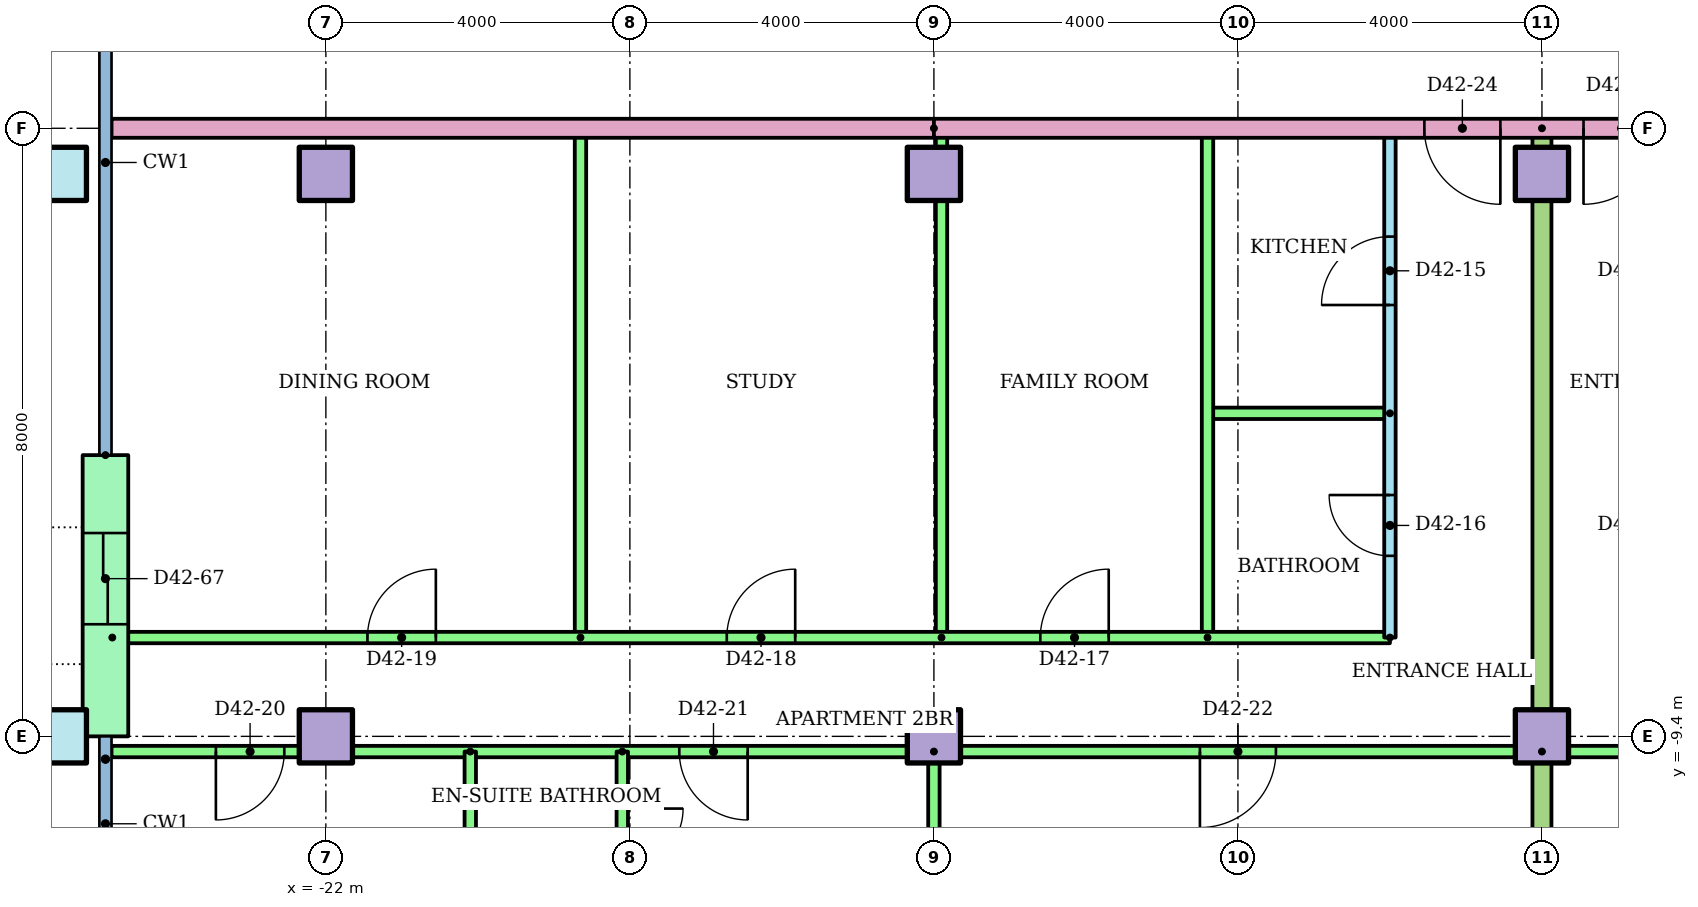
"""IFC4 building model, lengths in metres.
Left out: names, types, materials, properties, quantities, classifications, styles, units other than length and angle.
Written with IfcOpenShell. Run it as: python <this file> out.ifc"""

import sys

from ifc_helpers import new_model, si_unit, direction, frame, frame_2d, origin, origin_2d, place, context, subcontext, project, spatial, rectangle, hollow_rectangle, extrude, element, fill, save


model = new_model("IFC4")
c1 = context("Model", 3, precision=1e-05, world=origin(), true_north=direction((0.0, 1.0)))
c2 = subcontext(c1, "Body", "Model", "MODEL_VIEW")
j1 = project(units=[si_unit("LENGTHUNIT", "METRE"), si_unit("PLANEANGLEUNIT", "RADIAN")], contexts=[c1])
p1 = place(None, origin())
s1 = spatial("IfcSite", under=j1, at=p1, CompositionType="ELEMENT")
p2 = place(p1, origin())
s2 = spatial("IfcBuilding", under=s1, at=p2, CompositionType="ELEMENT")
p3 = place(p2, frame((0.0, 0.0, 165.3)))
s3 = spatial("IfcBuildingStorey", under=s2, at=p3, CompositionType="ELEMENT", Elevation=165.3)
p4 = place(p3, frame((-25.5, -9.4, 0.0)))
e1 = element("IfcColumn", 1, at=p4, inside=s3, PredefinedType="COLUMN", context=c2, shape_type="SweptSolid", body=[
    extrude(hollow_rectangle(XDim=0.7, YDim=0.7, WallThickness=0.036, at=origin_2d()), origin(), (0.0, 0.0, 1.0), 3.2),
])
for number, where in (
    (2, (-22.0, -9.4, 0.0)),
    (3, (-14.0, -9.4, 0.0)),
    (4, (-6.0, -9.4, 0.0)),
):
    element("IfcColumn", number, at=place(p3, frame(where)), inside=s3, PredefinedType="COLUMN", context=c2, shape_type="SweptSolid", body=[
        extrude(rectangle(XDim=0.7, YDim=0.7, at=origin_2d()), origin(), (0.0, 0.0, 1.0), 3.2),
    ])
p5 = place(p3, frame((-25.5, -2.0, 0.0)))
e5 = element("IfcColumn", 5, at=p5, inside=s3, PredefinedType="COLUMN", context=c2, shape_type="SweptSolid", body=[
    extrude(hollow_rectangle(XDim=0.7, YDim=0.7, WallThickness=0.036, at=origin_2d()), origin(), (0.0, 0.0, 1.0), 3.2),
])
for number, where in (
    (6, (-22.0, -2.0, 0.0)),
    (7, (-14.0, -2.0, 0.0)),
    (8, (-6.0, -2.0, 0.0)),
):
    element("IfcColumn", number, at=place(p3, frame(where)), inside=s3, PredefinedType="COLUMN", context=c2, shape_type="SweptSolid", body=[
        extrude(rectangle(XDim=0.7, YDim=0.7, at=origin_2d()), origin(), (0.0, 0.0, 1.0), 3.2),
    ])
p6 = place(p3, frame((-24.9, -5.7, 0.0), z_axis=(0.0, 0.0, 1.0), x_axis=(0.0, -1.0, 0.0)))
e9 = element("IfcWall", 9, at=p6, inside=s3, PredefinedType="STANDARD", context=c2, shape_type="SweptSolid", body=[
    extrude(rectangle(XDim=3.7, YDim=0.6, at=frame_2d((1.85, 0.0))), origin(), (0.0, 0.0, 1.0), 2.92),
])
p7 = place(p6, frame((1.025, 0.0, 0.0)))
e10 = element("IfcOpeningElement", 10, at=p7, cuts=e9, PredefinedType="OPENING", context=c2, shape_type="SweptSolid", body=[
    extrude(rectangle(XDim=1.2, YDim=2.1, at=frame_2d((0.6, 1.05))), frame((0.0, 0.31, 0.0), z_axis=(0.0, -1.0, 0.0), x_axis=(1.0, 0.0, 0.0)), (0.0, 0.0, 1.0), 0.62),
])
p8 = place(p3, frame((-8.0, -8.1, 0.0), z_axis=(0.0, 0.0, 1.0), x_axis=(0.0, 1.0, 0.0)))
e11 = element("IfcWall", 11, at=p8, inside=s3, PredefinedType="PARTITIONING", context=c2, shape_type="SweptSolid", body=[
    extrude(rectangle(XDim=6.7, YDim=0.15, at=frame_2d((3.35, 0.0))), origin(), (0.0, 0.0, 1.0), 2.4),
])
p9 = place(p8, frame((4.375, 0.0, 0.0)))
e12 = element("IfcOpeningElement", 12, at=p9, cuts=e11, PredefinedType="OPENING", context=c2, shape_type="SweptSolid", body=[
    extrude(rectangle(XDim=0.9, YDim=2.1, at=frame_2d((0.45, 1.05))), frame((0.0, 0.085, 0.0), z_axis=(0.0, -1.0, 0.0), x_axis=(1.0, 0.0, 0.0)), (0.0, 0.0, 1.0), 0.17),
])
p10 = place(p8, frame((1.075, 0.0, 0.0)))
e13 = element("IfcOpeningElement", 13, at=p10, cuts=e11, PredefinedType="OPENING", context=c2, shape_type="SweptSolid", body=[
    extrude(rectangle(XDim=0.8, YDim=2.1, at=frame_2d((0.4, 1.05))), frame((0.0, 0.085, 0.0), z_axis=(0.0, -1.0, 0.0), x_axis=(1.0, 0.0, 0.0)), (0.0, 0.0, 1.0), 0.17),
])
p11 = place(p3, frame((-8.0, -5.15, 0.0), z_axis=(0.0, 0.0, 1.0), x_axis=(-1.0, 0.0, 0.0)))
e14 = element("IfcWall", 14, at=p11, inside=s3, PredefinedType="PARTITIONING", context=c2, shape_type="SweptSolid", body=[
    extrude(rectangle(XDim=2.4, YDim=0.15, at=frame_2d((1.2, 0.0))), origin(), (0.0, 0.0, 1.0), 2.4),
])
for number, where, z_axis, x_axis in (
    (15, (-10.4, -8.1, 0.0), (0.0, 0.0, 1.0), (0.0, 1.0, 0.0)),
    (16, (-13.9, -8.1, 0.0), (0.0, 0.0, 1.0), (0.0, 1.0, 0.0)),
    (17, (-18.65, -8.1, 0.0), (0.0, 0.0, 1.0), (0.0, 1.0, 0.0)),
):
    element("IfcWall", number, at=place(p3, frame(where, z_axis=z_axis, x_axis=x_axis)), inside=s3, PredefinedType="PARTITIONING", context=c2, shape_type="SweptSolid", body=[
        extrude(rectangle(XDim=6.7, YDim=0.15, at=frame_2d((3.35, 0.0))), origin(), (0.0, 0.0, 1.0), 2.4),
    ])
p12 = place(p3, frame((-24.81, -8.1, 0.0)))
e18 = element("IfcWall", 18, at=p12, inside=s3, PredefinedType="PARTITIONING", context=c2, shape_type="SweptSolid", body=[
    extrude(rectangle(XDim=16.81, YDim=0.15, at=frame_2d((8.405, 0.0))), origin(), (0.0, 0.0, 1.0), 2.4),
])
p13 = place(p12, frame((12.21, 0.0, 0.0)))
e19 = element("IfcOpeningElement", 19, at=p13, cuts=e18, PredefinedType="OPENING", context=c2, shape_type="SweptSolid", body=[
    extrude(rectangle(XDim=0.9, YDim=2.1, at=frame_2d((0.45, 1.05))), frame((0.0, 0.085, 0.0), z_axis=(0.0, -1.0, 0.0), x_axis=(1.0, 0.0, 0.0)), (0.0, 0.0, 1.0), 0.17),
])
p14 = place(p12, frame((8.085, 0.0, 0.0)))
e20 = element("IfcOpeningElement", 20, at=p14, cuts=e18, PredefinedType="OPENING", context=c2, shape_type="SweptSolid", body=[
    extrude(rectangle(XDim=0.9, YDim=2.1, at=frame_2d((0.45, 1.05))), frame((0.0, 0.085, 0.0), z_axis=(0.0, -1.0, 0.0), x_axis=(1.0, 0.0, 0.0)), (0.0, 0.0, 1.0), 0.17),
])
p15 = place(p12, frame((3.357, 0.0, 0.0)))
e21 = element("IfcOpeningElement", 21, at=p15, cuts=e18, PredefinedType="OPENING", context=c2, shape_type="SweptSolid", body=[
    extrude(rectangle(XDim=0.9, YDim=2.1, at=frame_2d((0.45, 1.05))), frame((0.0, 0.085, 0.0), z_axis=(0.0, -1.0, 0.0), x_axis=(1.0, 0.0, 0.0)), (0.0, 0.0, 1.0), 0.17),
])
p16 = place(p3, frame((-6.0, -9.6, 0.0), z_axis=(0.0, 0.0, 1.0), x_axis=(-1.0, 0.0, 0.0)))
e22 = element("IfcWall", 22, at=p16, inside=s3, PredefinedType="PARTITIONING", context=c2, shape_type="SweptSolid", body=[
    extrude(rectangle(XDim=18.82, YDim=0.15, at=frame_2d((9.41, 0.0))), origin(), (0.0, 0.0, 1.0), 2.4),
])
p17 = place(p16, frame((16.547, 0.0, 0.0)))
e23 = element("IfcOpeningElement", 23, at=p17, cuts=e22, PredefinedType="OPENING", context=c2, shape_type="SweptSolid", body=[
    extrude(rectangle(XDim=0.9, YDim=2.1, at=frame_2d((0.45, 1.05))), frame((0.0, 0.085, 0.0), z_axis=(0.0, -1.0, 0.0), x_axis=(1.0, 0.0, 0.0)), (0.0, 0.0, 1.0), 0.17),
])
p18 = place(p16, frame((10.45, 0.0, 0.0)))
e24 = element("IfcOpeningElement", 24, at=p18, cuts=e22, PredefinedType="OPENING", context=c2, shape_type="SweptSolid", body=[
    extrude(rectangle(XDim=0.9, YDim=2.1, at=frame_2d((0.45, 1.05))), frame((0.0, 0.085, 0.0), z_axis=(0.0, -1.0, 0.0), x_axis=(1.0, 0.0, 0.0)), (0.0, 0.0, 1.0), 0.17),
])
p19 = place(p16, frame((3.5, 0.0, 0.0)))
e25 = element("IfcOpeningElement", 25, at=p19, cuts=e22, PredefinedType="OPENING", context=c2, shape_type="SweptSolid", body=[
    extrude(rectangle(XDim=1.0, YDim=2.1, at=frame_2d((0.5, 1.05))), frame((0.0, 0.085, 0.0), z_axis=(0.0, -1.0, 0.0), x_axis=(1.0, 0.0, 0.0)), (0.0, 0.0, 1.0), 0.17),
])
p20 = place(p3, frame((-20.1, -9.6, 0.0), z_axis=(0.0, 0.0, 1.0), x_axis=(0.0, -1.0, 0.0)))
e26 = element("IfcWall", 26, at=p20, inside=s3, PredefinedType="PARTITIONING", context=c2, shape_type="SweptSolid", body=[
    extrude(rectangle(XDim=5.02, YDim=0.15, at=frame_2d((2.51, 0.0))), origin(), (0.0, 0.0, 1.0), 2.4),
])
p21 = place(p3, frame((-14.0, -9.6, 0.0), z_axis=(0.0, 0.0, 1.0), x_axis=(0.0, -1.0, 0.0)))
e27 = element("IfcWall", 27, at=p21, inside=s3, PredefinedType="PARTITIONING", context=c2, shape_type="SweptSolid", body=[
    extrude(rectangle(XDim=6.81, YDim=0.15, at=frame_2d((3.405, 0.0))), origin(), (0.0, 0.0, 1.0), 2.4),
])
p22 = place(p3, frame((-18.1, -9.6, 0.0), z_axis=(0.0, 0.0, 1.0), x_axis=(0.0, -1.0, 0.0)))
e28 = element("IfcWall", 28, at=p22, inside=s3, PredefinedType="PARTITIONING", context=c2, shape_type="SweptSolid", body=[
    extrude(rectangle(XDim=2.3, YDim=0.15, at=frame_2d((1.15, 0.0))), origin(), (0.0, 0.0, 1.0), 2.4),
])
p23 = place(p22, frame((0.75, 0.0, 0.0)))
e29 = element("IfcOpeningElement", 29, at=p23, cuts=e28, PredefinedType="OPENING", context=c2, shape_type="SweptSolid", body=[
    extrude(rectangle(XDim=0.8, YDim=2.1, at=frame_2d((0.4, 1.05))), frame((0.0, 0.085, 0.0), z_axis=(0.0, -1.0, 0.0), x_axis=(1.0, 0.0, 0.0)), (0.0, 0.0, 1.0), 0.17),
])
p24 = place(p3, frame((10.0, -9.6, 0.0), z_axis=(0.0, 0.0, 1.0), x_axis=(-1.0, 0.0, 0.0)))
e30 = element("IfcWall", 30, at=p24, inside=s3, PredefinedType="PARTITIONING", context=c2, shape_type="SweptSolid", body=[
    extrude(rectangle(XDim=16.0, YDim=0.15, at=frame_2d((8.0, 0.0))), origin(), (0.0, 0.0, 1.0), 2.4),
])
p25 = place(p24, frame((13.55, 0.0, 0.0)))
e31 = element("IfcOpeningElement", 31, at=p25, cuts=e30, PredefinedType="OPENING", context=c2, shape_type="SweptSolid", body=[
    extrude(rectangle(XDim=0.9, YDim=2.1, at=frame_2d((0.45, 1.05))), frame((0.0, 0.085, 0.0), z_axis=(0.0, -1.0, 0.0), x_axis=(1.0, 0.0, 0.0)), (0.0, 0.0, 1.0), 0.17),
])
p26 = place(p24, frame((9.55, 0.0, 0.0)))
e32 = element("IfcOpeningElement", 32, at=p26, cuts=e30, PredefinedType="OPENING", context=c2, shape_type="SweptSolid", body=[
    extrude(rectangle(XDim=0.9, YDim=2.1, at=frame_2d((0.45, 1.05))), frame((0.0, 0.085, 0.0), z_axis=(0.0, -1.0, 0.0), x_axis=(1.0, 0.0, 0.0)), (0.0, 0.0, 1.0), 0.17),
])
p27 = place(p24, frame((5.55, 0.0, 0.0)))
e33 = element("IfcOpeningElement", 33, at=p27, cuts=e30, PredefinedType="OPENING", context=c2, shape_type="SweptSolid", body=[
    extrude(rectangle(XDim=0.9, YDim=2.1, at=frame_2d((0.45, 1.05))), frame((0.0, 0.085, 0.0), z_axis=(0.0, -1.0, 0.0), x_axis=(1.0, 0.0, 0.0)), (0.0, 0.0, 1.0), 0.17),
])
p28 = place(p24, frame((1.5, 0.0, 0.0)))
e34 = element("IfcOpeningElement", 34, at=p28, cuts=e30, PredefinedType="OPENING", context=c2, shape_type="SweptSolid", body=[
    extrude(rectangle(XDim=1.0, YDim=2.1, at=frame_2d((0.5, 1.05))), frame((0.0, 0.085, 0.0), z_axis=(0.0, -1.0, 0.0), x_axis=(1.0, 0.0, 0.0)), (0.0, 0.0, 1.0), 0.17),
])
p29 = place(p3, frame((-6.0, -1.4, 0.0), z_axis=(0.0, 0.0, 1.0), x_axis=(0.0, -1.0, 0.0)))
e35 = element("IfcWall", 35, at=p29, inside=s3, PredefinedType="PARTITIONING", context=c2, shape_type="SweptSolid", body=[
    extrude(rectangle(XDim=15.01, YDim=0.25, at=frame_2d((7.505, 0.0))), origin(), (0.0, 0.0, 1.0), 2.4),
])
p30 = place(p3, frame((-14.0, -1.4, 0.0), z_axis=(0.0, 0.0, 1.0), x_axis=(-1.0, 0.0, 0.0)))
e36 = element("IfcWall", 36, at=p30, inside=s3, PredefinedType="PARTITIONING", context=c2, shape_type="SweptSolid", body=[
    extrude(rectangle(XDim=10.82, YDim=0.25, at=frame_2d((5.41, 0.0))), origin(), (0.0, 0.0, 1.0), 2.4),
])
p31 = place(p3, frame((14.0, -1.4, 0.0), z_axis=(0.0, 0.0, 1.0), x_axis=(-1.0, 0.0, 0.0)))
e37 = element("IfcWall", 37, at=p31, inside=s3, PredefinedType="PARTITIONING", context=c2, shape_type="SweptSolid", body=[
    extrude(rectangle(XDim=28.0, YDim=0.25, at=frame_2d((14.0, 0.0))), origin(), (0.0, 0.0, 1.0), 2.4),
])
p32 = place(p31, frame((20.547, 0.0, 0.0)))
e38 = element("IfcOpeningElement", 38, at=p32, cuts=e37, PredefinedType="OPENING", context=c2, shape_type="SweptSolid", body=[
    extrude(rectangle(XDim=1.0, YDim=2.1, at=frame_2d((0.5, 1.05))), frame((0.0, 0.135, 0.0), z_axis=(0.0, -1.0, 0.0), x_axis=(1.0, 0.0, 0.0)), (0.0, 0.0, 1.0), 0.27),
])
p33 = place(p31, frame((18.453, 0.0, 0.0)))
e39 = element("IfcOpeningElement", 39, at=p33, cuts=e37, PredefinedType="OPENING", context=c2, shape_type="SweptSolid", body=[
    extrude(rectangle(XDim=1.0, YDim=2.1, at=frame_2d((0.5, 1.05))), frame((0.0, 0.135, 0.0), z_axis=(0.0, -1.0, 0.0), x_axis=(1.0, 0.0, 0.0)), (0.0, 0.0, 1.0), 0.27),
])
p34 = place(p31, frame((2.453, 0.0, 0.0)))
e40 = element("IfcOpeningElement", 40, at=p34, cuts=e37, PredefinedType="OPENING", context=c2, shape_type="SweptSolid", body=[
    extrude(rectangle(XDim=1.0, YDim=2.1, at=frame_2d((0.5, 1.05))), frame((0.0, 0.135, 0.0), z_axis=(0.0, -1.0, 0.0), x_axis=(1.0, 0.0, 0.0)), (0.0, 0.0, 1.0), 0.27),
])
p35 = place(p9, origin())
e41 = element("IfcDoor", 41, at=p35, inside=s3, OperationType="SINGLE_SWING_LEFT", PredefinedType="DOOR", context=c2, shape_type="SweptSolid", body=[
    extrude(rectangle(XDim=0.9, YDim=2.1, at=frame_2d((0.45, 1.05))), frame((0.0, 0.025, 0.0), z_axis=(0.0, -1.0, 0.0), x_axis=(1.0, 0.0, 0.0)), (0.0, 0.0, 1.0), 0.05),
])
fill(e12, e41)
p36 = place(p10, origin())
e42 = element("IfcDoor", 42, at=p36, inside=s3, OperationType="SINGLE_SWING_RIGHT", PredefinedType="DOOR", context=c2, shape_type="SweptSolid", body=[
    extrude(rectangle(XDim=0.8, YDim=2.1, at=frame_2d((0.4, 1.05))), frame((0.0, 0.025, 0.0), z_axis=(0.0, -1.0, 0.0), x_axis=(1.0, 0.0, 0.0)), (0.0, 0.0, 1.0), 0.05),
])
fill(e13, e42)
p37 = place(p13, origin())
e43 = element("IfcDoor", 43, at=p37, inside=s3, OperationType="SINGLE_SWING_RIGHT", PredefinedType="DOOR", context=c2, shape_type="SweptSolid", body=[
    extrude(rectangle(XDim=0.9, YDim=2.1, at=frame_2d((0.45, 1.05))), frame((0.0, 0.025, 0.0), z_axis=(0.0, -1.0, 0.0), x_axis=(1.0, 0.0, 0.0)), (0.0, 0.0, 1.0), 0.05),
])
fill(e19, e43)
p38 = place(p14, origin())
e44 = element("IfcDoor", 44, at=p38, inside=s3, OperationType="SINGLE_SWING_RIGHT", PredefinedType="DOOR", context=c2, shape_type="SweptSolid", body=[
    extrude(rectangle(XDim=0.9, YDim=2.1, at=frame_2d((0.45, 1.05))), frame((0.0, 0.025, 0.0), z_axis=(0.0, -1.0, 0.0), x_axis=(1.0, 0.0, 0.0)), (0.0, 0.0, 1.0), 0.05),
])
fill(e20, e44)
p39 = place(p15, origin())
e45 = element("IfcDoor", 45, at=p39, inside=s3, OperationType="SINGLE_SWING_RIGHT", PredefinedType="DOOR", context=c2, shape_type="SweptSolid", body=[
    extrude(rectangle(XDim=0.9, YDim=2.1, at=frame_2d((0.45, 1.05))), frame((0.0, 0.025, 0.0), z_axis=(0.0, -1.0, 0.0), x_axis=(1.0, 0.0, 0.0)), (0.0, 0.0, 1.0), 0.05),
])
fill(e21, e45)
p40 = place(p17, origin())
e46 = element("IfcDoor", 46, at=p40, inside=s3, OperationType="SINGLE_SWING_RIGHT", PredefinedType="DOOR", context=c2, shape_type="SweptSolid", body=[
    extrude(rectangle(XDim=0.9, YDim=2.1, at=frame_2d((0.45, 1.05))), frame((0.0, 0.025, 0.0), z_axis=(0.0, -1.0, 0.0), x_axis=(1.0, 0.0, 0.0)), (0.0, 0.0, 1.0), 0.05),
])
fill(e23, e46)
p41 = place(p18, origin())
e47 = element("IfcDoor", 47, at=p41, inside=s3, OperationType="SINGLE_SWING_LEFT", PredefinedType="DOOR", context=c2, shape_type="SweptSolid", body=[
    extrude(rectangle(XDim=0.9, YDim=2.1, at=frame_2d((0.45, 1.05))), frame((0.0, 0.025, 0.0), z_axis=(0.0, -1.0, 0.0), x_axis=(1.0, 0.0, 0.0)), (0.0, 0.0, 1.0), 0.05),
])
fill(e24, e47)
p42 = place(p19, origin())
e48 = element("IfcDoor", 48, at=p42, inside=s3, OperationType="SINGLE_SWING_RIGHT", PredefinedType="DOOR", context=c2, shape_type="SweptSolid", body=[
    extrude(rectangle(XDim=1.0, YDim=2.1, at=frame_2d((0.5, 1.05))), frame((0.0, 0.025, 0.0), z_axis=(0.0, -1.0, 0.0), x_axis=(1.0, 0.0, 0.0)), (0.0, 0.0, 1.0), 0.05),
])
fill(e25, e48)
p43 = place(p23, origin())
e49 = element("IfcDoor", 49, at=p43, inside=s3, OperationType="SINGLE_SWING_LEFT", PredefinedType="DOOR", context=c2, shape_type="SweptSolid", body=[
    extrude(rectangle(XDim=0.8, YDim=2.1, at=frame_2d((0.4, 1.05))), frame((0.0, 0.025, 0.0), z_axis=(0.0, -1.0, 0.0), x_axis=(1.0, 0.0, 0.0)), (0.0, 0.0, 1.0), 0.05),
])
fill(e29, e49)
p44 = place(p32, origin())
e50 = element("IfcDoor", 50, at=p44, inside=s3, OperationType="SINGLE_SWING_LEFT", PredefinedType="DOOR", context=c2, shape_type="SweptSolid", body=[
    extrude(rectangle(XDim=1.0, YDim=2.1, at=frame_2d((0.5, 1.05))), frame((0.0, 0.025, 0.0), z_axis=(0.0, -1.0, 0.0), x_axis=(1.0, 0.0, 0.0)), (0.0, 0.0, 1.0), 0.05),
])
fill(e38, e50)
p45 = place(p33, origin())
e51 = element("IfcDoor", 51, at=p45, inside=s3, OperationType="SINGLE_SWING_RIGHT", PredefinedType="DOOR", context=c2, shape_type="SweptSolid", body=[
    extrude(rectangle(XDim=1.0, YDim=2.1, at=frame_2d((0.5, 1.05))), frame((0.0, 0.025, 0.0), z_axis=(0.0, -1.0, 0.0), x_axis=(1.0, 0.0, 0.0)), (0.0, 0.0, 1.0), 0.05),
])
fill(e39, e51)
p46 = place(p7, origin())
e52 = element("IfcDoor", 52, at=p46, inside=s3, OperationType="SLIDING_TO_LEFT", PredefinedType="DOOR", context=c2, shape_type="SweptSolid", body=[
    extrude(rectangle(XDim=1.2, YDim=2.1, at=frame_2d((0.6, 1.05))), frame((0.0, 0.025, 0.0), z_axis=(0.0, -1.0, 0.0), x_axis=(1.0, 0.0, 0.0)), (0.0, 0.0, 1.0), 0.05),
])
fill(e10, e52)
save(model, sys.argv[1])
